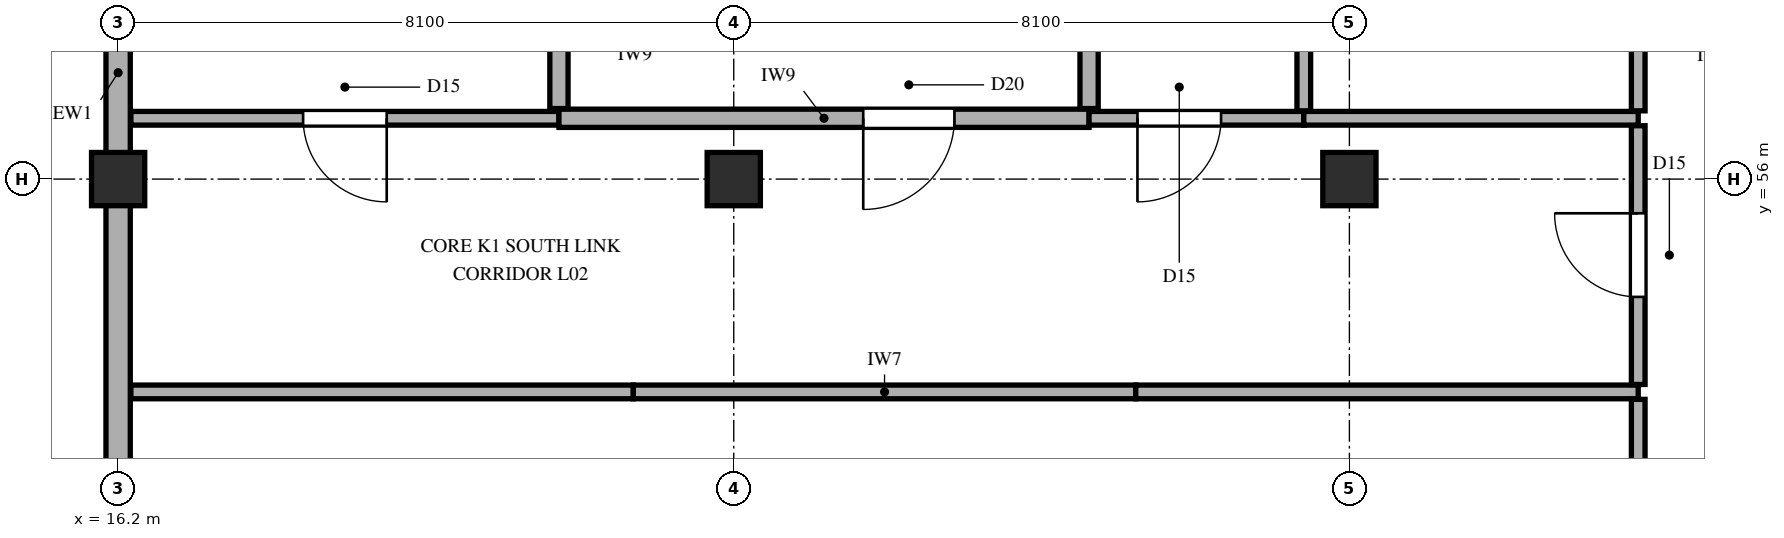
"""IFC4 building model, lengths in metres.
Left out: names, types, materials, properties, quantities, classifications, styles, units other than length and angle.
Written with IfcOpenShell. Run it as: python <this file> out.ifc"""

import sys

from ifc_helpers import new_model, si_unit, direction, frame, frame_2d, origin, origin_2d, place, context, subcontext, project, spatial, rectangle, extrude, element, fill, save


model = new_model("IFC4")
c1 = context("Model", 3, precision=1e-05, world=origin(), true_north=direction((0.0, 1.0)))
c2 = subcontext(c1, "Body", "Model", "MODEL_VIEW")
j1 = project(units=[si_unit("LENGTHUNIT", "METRE"), si_unit("PLANEANGLEUNIT", "RADIAN")], contexts=[c1])
p1 = place(None, origin())
s1 = spatial("IfcSite", under=j1, at=p1, CompositionType="ELEMENT")
p2 = place(p1, origin())
s2 = spatial("IfcBuilding", under=s1, at=p2, CompositionType="ELEMENT")
p3 = place(p2, frame((0.0, 0.0, 10.2)))
s3 = spatial("IfcBuildingStorey", under=s2, at=p3, CompositionType="ELEMENT", Elevation=10.2)
for number, where, z_axis, x_axis in (
    (1, (16.2, 56.0, 0.0), (0.0, 0.0, 1.0), (1.0, 0.0, 0.0)),
    (2, (24.3, 56.0, 0.0), (0.0, 0.0, 1.0), (1.0, 0.0, 0.0)),
    (3, (32.4, 56.0, 0.0), (0.0, 0.0, 1.0), (1.0, 0.0, 0.0)),
):
    element("IfcColumn", number, at=place(p3, frame(where, z_axis=z_axis, x_axis=x_axis)), inside=s3, PredefinedType="COLUMN", context=c2, shape_type="SweptSolid", body=[
        extrude(rectangle(XDim=0.7, YDim=0.7, at=origin_2d()), origin(), (0.0, 0.0, 1.0), 4.5),
    ])
p4 = place(p3, frame((16.2, 65.2, 0.0), z_axis=(0.0, 0.0, 1.0), x_axis=(0.0, -1.0, 0.0)))
e4 = element("IfcWall", 4, at=p4, inside=s3, PredefinedType="SOLIDWALL", context=c2, shape_type="SweptSolid", body=[
    extrude(rectangle(XDim=15.6, YDim=0.32, at=frame_2d((7.8, 0.0))), origin(), (0.0, 0.0, 1.0), 3.732),
])
p5 = place(p3, frame((16.368, 53.2, 0.0), z_axis=(0.0, 0.0, 1.0), x_axis=(1.0, 0.0, 0.0)))
e5 = element("IfcWall", 5, at=p5, inside=s3, PredefinedType="PARTITIONING", context=c2, shape_type="SweptSolid", body=[
    extrude(rectangle(XDim=6.611, YDim=0.18, at=frame_2d((3.305, 0.0))), origin(), (0.0, 0.0, 1.0), 4.24),
])
for number, where, z_axis, x_axis in (
    (6, (22.979, 53.2, 0.0), (0.0, 0.0, 1.0), (1.0, 0.0, 0.0)),
    (7, (29.589, 53.2, 0.0), (0.0, 0.0, 1.0), (1.0, 0.0, 0.0)),
):
    element("IfcWall", number, at=place(p3, frame(where, z_axis=z_axis, x_axis=x_axis)), inside=s3, PredefinedType="PARTITIONING", context=c2, shape_type="SweptSolid", body=[
        extrude(rectangle(XDim=6.611, YDim=0.18, at=frame_2d((3.305, 0.0))), origin(), (0.0, 0.0, 1.0), 4.24),
    ])
p6 = place(p3, frame((16.368, 56.8, 0.0), z_axis=(0.0, 0.0, 1.0), x_axis=(1.0, 0.0, 0.0)))
e8 = element("IfcWall", 8, at=p6, inside=s3, PredefinedType="PARTITIONING", context=c2, shape_type="SweptSolid", body=[
    extrude(rectangle(XDim=5.632, YDim=0.18, at=frame_2d((2.816, 0.0))), origin(), (0.0, 0.0, 1.0), 4.24),
])
p7 = place(p6, frame((2.266, 0.0, 0.0)))
e9 = element("IfcOpeningElement", 9, at=p7, cuts=e8, PredefinedType="OPENING", context=c2, shape_type="SweptSolid", body=[
    extrude(rectangle(XDim=1.1, YDim=2.2, at=frame_2d((0.55, 1.1))), frame((0.0, 0.1, 0.0), z_axis=(0.0, -1.0, 0.0), x_axis=(1.0, 0.0, 0.0)), (0.0, 0.0, 1.0), 0.2),
])
p8 = place(p3, frame((22.0, 56.8, 0.0), z_axis=(0.0, 0.0, 1.0), x_axis=(1.0, 0.0, 0.0)))
e10 = element("IfcWall", 10, at=p8, inside=s3, PredefinedType="PARTITIONING", context=c2, shape_type="SweptSolid", body=[
    extrude(rectangle(XDim=6.975, YDim=0.24, at=frame_2d((3.488, 0.0))), origin(), (0.0, 0.0, 1.0), 4.24),
])
p9 = place(p8, frame((4.003, 0.0, 0.0)))
e11 = element("IfcOpeningElement", 11, at=p9, cuts=e10, PredefinedType="OPENING", context=c2, shape_type="SweptSolid", body=[
    extrude(rectangle(XDim=1.2, YDim=2.3, at=frame_2d((0.6, 1.15))), frame((0.0, 0.13, 0.0), z_axis=(0.0, -1.0, 0.0), x_axis=(1.0, 0.0, 0.0)), (0.0, 0.0, 1.0), 0.26),
])
p10 = place(p3, frame((28.975, 56.8, 0.0), z_axis=(0.0, 0.0, 1.0), x_axis=(1.0, 0.0, 0.0)))
e12 = element("IfcWall", 12, at=p10, inside=s3, PredefinedType="PARTITIONING", context=c2, shape_type="SweptSolid", body=[
    extrude(rectangle(XDim=2.825, YDim=0.18, at=frame_2d((1.413, 0.0))), origin(), (0.0, 0.0, 1.0), 4.24),
])
p11 = place(p10, frame((0.636, 0.0, 0.0)))
e13 = element("IfcOpeningElement", 13, at=p11, cuts=e12, PredefinedType="OPENING", context=c2, shape_type="SweptSolid", body=[
    extrude(rectangle(XDim=1.1, YDim=2.2, at=frame_2d((0.55, 1.1))), frame((0.0, 0.1, 0.0), z_axis=(0.0, -1.0, 0.0), x_axis=(1.0, 0.0, 0.0)), (0.0, 0.0, 1.0), 0.2),
])
p12 = place(p3, frame((31.8, 56.8, 0.0), z_axis=(0.0, 0.0, 1.0), x_axis=(1.0, 0.0, 0.0)))
e14 = element("IfcWall", 14, at=p12, inside=s3, PredefinedType="PARTITIONING", context=c2, shape_type="SweptSolid", body=[
    extrude(rectangle(XDim=4.4, YDim=0.18, at=frame_2d((2.2, 0.0))), origin(), (0.0, 0.0, 1.0), 4.24),
])
p13 = place(p3, frame((22.0, 56.928, 0.0), z_axis=(0.0, 0.0, 1.0), x_axis=(0.0, 1.0, 0.0)))
e15 = element("IfcWall", 15, at=p13, inside=s3, PredefinedType="PARTITIONING", context=c2, shape_type="SweptSolid", body=[
    extrude(rectangle(XDim=3.214, YDim=0.24, at=frame_2d((1.607, 0.0))), origin(), (0.0, 0.0, 1.0), 4.24),
])
p14 = place(p13, frame((1.107, 0.0, 0.0)))
e16 = element("IfcOpeningElement", 16, at=p14, cuts=e15, PredefinedType="OPENING", context=c2, shape_type="SweptSolid", body=[
    extrude(rectangle(XDim=1.0, YDim=2.2, at=frame_2d((0.5, 1.1))), frame((0.0, 0.13, 0.0), z_axis=(0.0, -1.0, 0.0), x_axis=(1.0, 0.0, 0.0)), (0.0, 0.0, 1.0), 0.26),
])
p15 = place(p3, frame((28.975, 56.928, 0.0), z_axis=(0.0, 0.0, 1.0), x_axis=(0.0, 1.0, 0.0)))
e17 = element("IfcWall", 17, at=p15, inside=s3, PredefinedType="PARTITIONING", context=c2, shape_type="SweptSolid", body=[
    extrude(rectangle(XDim=3.214, YDim=0.24, at=frame_2d((1.607, 0.0))), origin(), (0.0, 0.0, 1.0), 4.24),
])
p16 = place(p3, frame((31.8, 56.898, 0.0), z_axis=(0.0, 0.0, 1.0), x_axis=(0.0, 1.0, 0.0)))
e18 = element("IfcWall", 18, at=p16, inside=s3, PredefinedType="PARTITIONING", context=c2, shape_type="SweptSolid", body=[
    extrude(rectangle(XDim=3.244, YDim=0.18, at=frame_2d((1.622, 0.0))), origin(), (0.0, 0.0, 1.0), 4.24),
])
p17 = place(p3, frame((36.2, 34.098, 0.0), z_axis=(0.0, 0.0, 1.0), x_axis=(0.0, 1.0, 0.0)))
e19 = element("IfcWall", 19, at=p17, inside=s3, PredefinedType="PARTITIONING", context=c2, shape_type="SweptSolid", body=[
    extrude(rectangle(XDim=19.004, YDim=0.18, at=frame_2d((9.502, 0.0))), origin(), (0.0, 0.0, 1.0), 3.825),
])
p18 = place(p17, frame((8.952, 0.0, 0.0)))
e20 = element("IfcOpeningElement", 20, at=p18, cuts=e19, PredefinedType="OPENING", context=c2, shape_type="SweptSolid", body=[
    extrude(rectangle(XDim=1.1, YDim=2.2, at=frame_2d((0.55, 1.1))), frame((0.0, 0.1, 0.0), z_axis=(0.0, -1.0, 0.0), x_axis=(1.0, 0.0, 0.0)), (0.0, 0.0, 1.0), 0.2),
])
p19 = place(p3, frame((36.2, 53.298, 0.0), z_axis=(0.0, 0.0, 1.0), x_axis=(0.0, 1.0, 0.0)))
e21 = element("IfcWall", 21, at=p19, inside=s3, PredefinedType="PARTITIONING", context=c2, shape_type="SweptSolid", body=[
    extrude(rectangle(XDim=3.404, YDim=0.18, at=frame_2d((1.702, 0.0))), origin(), (0.0, 0.0, 1.0), 3.825),
])
p20 = place(p19, frame((1.152, 0.0, 0.0)))
e22 = element("IfcOpeningElement", 22, at=p20, cuts=e21, PredefinedType="OPENING", context=c2, shape_type="SweptSolid", body=[
    extrude(rectangle(XDim=1.1, YDim=2.2, at=frame_2d((0.55, 1.1))), frame((0.0, 0.1, 0.0), z_axis=(0.0, -1.0, 0.0), x_axis=(1.0, 0.0, 0.0)), (0.0, 0.0, 1.0), 0.2),
])
p21 = place(p3, frame((36.2, 56.898, 0.0), z_axis=(0.0, 0.0, 1.0), x_axis=(0.0, 1.0, 0.0)))
e23 = element("IfcWall", 23, at=p21, inside=s3, PredefinedType="PARTITIONING", context=c2, shape_type="SweptSolid", body=[
    extrude(rectangle(XDim=3.404, YDim=0.18, at=frame_2d((1.702, 0.0))), origin(), (0.0, 0.0, 1.0), 4.24),
])
p22 = place(p21, frame((1.202, 0.0, 0.0)))
e24 = element("IfcOpeningElement", 24, at=p22, cuts=e23, PredefinedType="OPENING", context=c2, shape_type="SweptSolid", body=[
    extrude(rectangle(XDim=1.0, YDim=2.15, at=frame_2d((0.5, 1.075))), frame((0.0, 0.1, 0.0), z_axis=(0.0, -1.0, 0.0), x_axis=(1.0, 0.0, 0.0)), (0.0, 0.0, 1.0), 0.2),
])
p23 = place(p7, frame((1.1, 0.0, 0.0), z_axis=(0.0, 0.0, 1.0), x_axis=(-1.0, 0.0, 0.0)))
e25 = element("IfcDoor", 25, at=p23, inside=s3, OperationType="SINGLE_SWING_RIGHT", PredefinedType="DOOR", context=c2, shape_type="SweptSolid", body=[
    extrude(rectangle(XDim=1.1, YDim=2.2, at=frame_2d((0.55, 1.1))), frame((0.0, 0.025, 0.0), z_axis=(0.0, -1.0, 0.0), x_axis=(1.0, 0.0, 0.0)), (0.0, 0.0, 1.0), 0.05),
])
fill(e9, e25)
p24 = place(p9, frame((1.2, 0.0, 0.0), z_axis=(0.0, 0.0, 1.0), x_axis=(-1.0, 0.0, 0.0)))
e26 = element("IfcDoor", 26, at=p24, inside=s3, OperationType="SINGLE_SWING_LEFT", PredefinedType="DOOR", context=c2, shape_type="SweptSolid", body=[
    extrude(rectangle(XDim=1.2, YDim=2.3, at=frame_2d((0.6, 1.15))), frame((0.0, 0.025, 0.0), z_axis=(0.0, -1.0, 0.0), x_axis=(1.0, 0.0, 0.0)), (0.0, 0.0, 1.0), 0.05),
])
fill(e11, e26)
p25 = place(p11, frame((1.1, 0.0, 0.0), z_axis=(0.0, 0.0, 1.0), x_axis=(-1.0, 0.0, 0.0)))
e27 = element("IfcDoor", 27, at=p25, inside=s3, OperationType="SINGLE_SWING_LEFT", PredefinedType="DOOR", context=c2, shape_type="SweptSolid", body=[
    extrude(rectangle(XDim=1.1, YDim=2.2, at=frame_2d((0.55, 1.1))), frame((0.0, 0.025, 0.0), z_axis=(0.0, -1.0, 0.0), x_axis=(1.0, 0.0, 0.0)), (0.0, 0.0, 1.0), 0.05),
])
fill(e13, e27)
p26 = place(p20, origin())
e28 = element("IfcDoor", 28, at=p26, inside=s3, OperationType="SINGLE_SWING_RIGHT", PredefinedType="DOOR", context=c2, shape_type="SweptSolid", body=[
    extrude(rectangle(XDim=1.1, YDim=2.2, at=frame_2d((0.55, 1.1))), frame((0.0, 0.025, 0.0), z_axis=(0.0, -1.0, 0.0), x_axis=(1.0, 0.0, 0.0)), (0.0, 0.0, 1.0), 0.05),
])
fill(e22, e28)
save(model, sys.argv[1])
